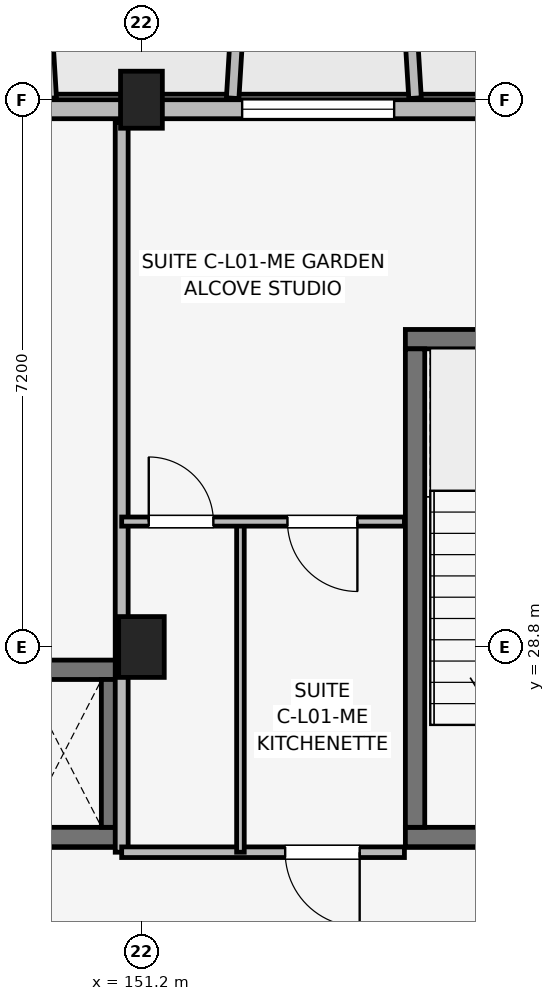
"""IFC4 building model, lengths in metres.
Left out: names, types, materials, properties, quantities, classifications, styles, units other than length and angle.
Written with IfcOpenShell. Run it as: python <this file> out.ifc"""

import sys

from ifc_helpers import new_model, si_unit, direction, frame, frame_2d, origin, origin_2d, place, context, subcontext, project, spatial, rectangle, extrude, element, fill, save


model = new_model("IFC4")
c1 = context("Model", 3, precision=1e-05, world=origin(), true_north=direction((0.0, 1.0)))
c2 = subcontext(c1, "Body", "Model", "MODEL_VIEW")
j1 = project(units=[si_unit("LENGTHUNIT", "METRE"), si_unit("PLANEANGLEUNIT", "RADIAN")], contexts=[c1])
p1 = place(None, origin())
s1 = spatial("IfcSite", under=j1, at=p1, CompositionType="ELEMENT")
p2 = place(p1, origin())
s2 = spatial("IfcBuilding", under=s1, at=p2, CompositionType="ELEMENT")
p3 = place(p2, frame((0.0, 0.0, 4.5)))
s3 = spatial("IfcBuildingStorey", under=s2, at=p3, CompositionType="ELEMENT", Elevation=4.5)
p4 = place(p3, frame((151.2, 28.8, 0.0), z_axis=(0.0, 0.0, 1.0), x_axis=(1.0, 0.0, 0.0)))
e1 = element("IfcColumn", 1, at=p4, inside=s3, PredefinedType="COLUMN", context=c2, shape_type="SweptSolid", body=[
    extrude(rectangle(XDim=0.6, YDim=0.8, at=origin_2d()), origin(), (0.0, 0.0, 1.0), 4.2),
])
p5 = place(p3, frame((151.2, 36.0, 0.0), z_axis=(0.0, 0.0, 1.0), x_axis=(1.0, 0.0, 0.0)))
e2 = element("IfcColumn", 2, at=p5, inside=s3, PredefinedType="COLUMN", context=c2, shape_type="SweptSolid", body=[
    extrude(rectangle(XDim=0.55, YDim=0.75, at=origin_2d()), origin(), (0.0, 0.0, 1.0), 4.2),
])
p6 = place(p3, frame((154.673, 26.3, 0.0), z_axis=(0.0, 0.0, 1.0), x_axis=(1.0, 0.0, 0.0)))
e3 = element("IfcWall", 3, at=p6, inside=s3, PredefinedType="SHEAR", context=c2, shape_type="SweptSolid", body=[
    extrude(rectangle(XDim=3.305, YDim=0.255, at=frame_2d((1.652, 0.0))), origin(), (0.0, 0.0, 1.0), 4.2),
])
p7 = place(p6, frame((1.127, 0.0, 0.0)))
e4 = element("IfcOpeningElement", 4, at=p7, cuts=e3, PredefinedType="OPENING", context=c2, shape_type="SweptSolid", body=[
    extrude(rectangle(XDim=1.05, YDim=2.12, at=frame_2d((0.525, 1.06))), frame((0.0, 0.137, 0.0), z_axis=(0.0, -1.0, 0.0), x_axis=(1.0, 0.0, 0.0)), (0.0, 0.0, 1.0), 0.275),
])
p8 = place(p3, frame((154.673, 32.85, 0.0), z_axis=(0.0, 0.0, 1.0), x_axis=(1.0, 0.0, 0.0)))
e5 = element("IfcWall", 5, at=p8, inside=s3, PredefinedType="SHEAR", context=c2, shape_type="SweptSolid", body=[
    extrude(rectangle(XDim=3.305, YDim=0.255, at=frame_2d((1.652, 0.0))), origin(), (0.0, 0.0, 1.0), 4.2),
])
p9 = place(p3, frame((154.8, 26.427, 0.0), z_axis=(0.0, 0.0, 1.0), x_axis=(0.0, 1.0, 0.0)))
e6 = element("IfcWall", 6, at=p9, inside=s3, PredefinedType="SHEAR", context=c2, shape_type="SweptSolid", body=[
    extrude(rectangle(XDim=6.295, YDim=0.255, at=frame_2d((3.147, 0.0))), origin(), (0.0, 0.0, 1.0), 4.2),
])
for number, where, z_axis, x_axis in (
    (7, (149.123, 26.3, 0.0), (0.0, 0.0, 1.0), (1.0, 0.0, 0.0)),
    (8, (149.123, 28.5, 0.0), (0.0, 0.0, 1.0), (1.0, 0.0, 0.0)),
):
    element("IfcWall", number, at=place(p3, frame(where, z_axis=z_axis, x_axis=x_axis)), inside=s3, PredefinedType="SHEAR", context=c2, shape_type="SweptSolid", body=[
        extrude(rectangle(XDim=1.805, YDim=0.255, at=frame_2d((0.902, 0.0))), origin(), (0.0, 0.0, 1.0), 4.2),
    ])
p10 = place(p3, frame((150.8, 26.427, 0.0), z_axis=(0.0, 0.0, 1.0), x_axis=(0.0, 1.0, 0.0)))
e9 = element("IfcWall", 9, at=p10, inside=s3, PredefinedType="SHEAR", context=c2, shape_type="SweptSolid", body=[
    extrude(rectangle(XDim=1.945, YDim=0.255, at=frame_2d((0.973, 0.0))), origin(), (0.0, 0.0, 1.0), 4.2),
])
p11 = place(p3, frame((162.6, 35.875, 0.0), z_axis=(0.0, 0.0, 1.0), x_axis=(-1.0, 0.0, 0.0)))
e10 = element("IfcWall", 10, at=p11, inside=s3, PredefinedType="SOLIDWALL", context=c2, shape_type="SweptSolid", body=[
    extrude(rectangle(XDim=30.0, YDim=0.25, at=frame_2d((15.0, 0.0))), origin(), (0.0, 0.0, 1.0), 3.48),
])
p12 = place(p11, frame((29.1, 0.0, 0.0), z_axis=(0.0, 0.0, 1.0), x_axis=(-1.0, 0.0, 0.0)))
e11 = element("IfcOpeningElement", 11, at=p12, cuts=e10, PredefinedType="OPENING", context=c2, shape_type="SweptSolid", body=[
    extrude(rectangle(XDim=1.8, YDim=2.15, at=frame_2d((0.9, 1.075))), frame((0.0, 0.135, 0.0), z_axis=(0.0, -1.0, 0.0), x_axis=(1.0, 0.0, 0.0)), (0.0, 0.0, 1.0), 0.27),
])
p13 = place(p11, frame((2.55, 0.0, 0.0), z_axis=(0.0, 0.0, 1.0), x_axis=(-1.0, 0.0, 0.0)))
e12 = element("IfcOpeningElement", 12, at=p13, cuts=e10, PredefinedType="OPENING", context=c2, shape_type="SweptSolid", body=[
    extrude(rectangle(XDim=1.5, YDim=2.15, at=frame_2d((0.75, 1.075))), frame((0.0, 0.135, 0.0), z_axis=(0.0, -1.0, 0.0), x_axis=(1.0, 0.0, 0.0)), (0.0, 0.0, 1.0), 0.27),
])
p14 = place(p11, frame((15.355, 0.0, 0.5)))
e13 = element("IfcOpeningElement", 13, at=p14, cuts=e10, PredefinedType="OPENING", context=c2, shape_type="SweptSolid", body=[
    extrude(rectangle(XDim=0.9, YDim=1.8, at=frame_2d((0.45, 0.9))), frame((0.0, 0.135, 0.0), z_axis=(0.0, -1.0, 0.0), x_axis=(1.0, 0.0, 0.0)), (0.0, 0.0, 1.0), 0.27),
])
p15 = place(p11, frame((8.075, 0.0, 0.7)))
e14 = element("IfcOpeningElement", 14, at=p15, cuts=e10, PredefinedType="OPENING", context=c2, shape_type="SweptSolid", body=[
    extrude(rectangle(XDim=2.0, YDim=1.65, at=frame_2d((1.0, 0.825))), frame((0.0, 0.135, 0.0), z_axis=(0.0, -1.0, 0.0), x_axis=(1.0, 0.0, 0.0)), (0.0, 0.0, 1.0), 0.27),
])
p16 = place(p11, frame((19.97, 0.0, 0.7)))
e15 = element("IfcOpeningElement", 15, at=p16, cuts=e10, PredefinedType="OPENING", context=c2, shape_type="SweptSolid", body=[
    extrude(rectangle(XDim=1.86, YDim=1.6, at=frame_2d((0.93, 0.8))), frame((0.0, 0.135, 0.0), z_axis=(0.0, -1.0, 0.0), x_axis=(1.0, 0.0, 0.0)), (0.0, 0.0, 1.0), 0.27),
])
p17 = place(p3, frame((150.0, 36.02, 0.0), z_axis=(0.0, 0.0, 1.0), x_axis=(-0.061170732449, 0.998127317276, 0.0)))
e16 = element("IfcWall", 16, at=p17, inside=s3, PredefinedType="ELEMENTEDWALL", context=c2, shape_type="SweptSolid", body=[
    extrude(rectangle(XDim=1.964, YDim=0.165, at=frame_2d((0.982, 0.0))), origin(), (0.0, 0.0, 1.0), 3.53),
])
for number, where, z_axis, x_axis in (
    (17, (152.4, 36.02, 0.0), (0.0, 0.0, 1.0), (0.061, 0.998, 0.0)),
    (18, (154.8, 36.02, 0.0), (0.0, 0.0, 1.0), (-0.061, 0.998, 0.0)),
):
    element("IfcWall", number, at=place(p3, frame(where, z_axis=z_axis, x_axis=x_axis)), inside=s3, PredefinedType="ELEMENTEDWALL", context=c2, shape_type="SweptSolid", body=[
        extrude(rectangle(XDim=1.964, YDim=0.165, at=frame_2d((0.982, 0.0))), origin(), (0.0, 0.0, 1.0), 3.58),
    ])
p18 = place(p3, frame((150.94, 26.1, 0.0), z_axis=(0.0, 0.0, 1.0), x_axis=(0.0, 1.0, 0.0)))
e19 = element("IfcWall", 19, at=p18, inside=s3, PredefinedType="PARTITIONING", context=c2, shape_type="SweptSolid", body=[
    extrude(rectangle(XDim=9.6, YDim=0.17, at=frame_2d((4.8, 0.0))), origin(), (0.0, 0.0, 1.0), 3.25),
])
p19 = place(p3, frame((150.94, 26.1, 0.0), z_axis=(0.0, 0.0, 1.0), x_axis=(1.0, 0.0, 0.0)))
e20 = element("IfcWall", 20, at=p19, inside=s3, PredefinedType="PARTITIONING", context=c2, shape_type="SweptSolid", body=[
    extrude(rectangle(XDim=3.72, YDim=0.14, at=frame_2d((1.86, 0.0))), origin(), (0.0, 0.0, 1.0), 3.25),
])
p20 = place(p19, frame((3.131, 0.0, 0.0), z_axis=(0.0, 0.0, 1.0), x_axis=(-1.0, 0.0, 0.0)))
e21 = element("IfcOpeningElement", 21, at=p20, cuts=e20, PredefinedType="OPENING", context=c2, shape_type="SweptSolid", body=[
    extrude(rectangle(XDim=0.98, YDim=2.1, at=frame_2d((0.49, 1.05))), frame((0.0, 0.08, 0.0), z_axis=(0.0, -1.0, 0.0), x_axis=(1.0, 0.0, 0.0)), (0.0, 0.0, 1.0), 0.16),
])
p21 = place(p3, frame((152.502, 26.1, 0.0), z_axis=(0.0, 0.0, 1.0), x_axis=(0.0, 1.0, 0.0)))
e22 = element("IfcWall", 22, at=p21, inside=s3, PredefinedType="PARTITIONING", context=c2, shape_type="SweptSolid", body=[
    extrude(rectangle(XDim=4.35, YDim=0.1, at=frame_2d((2.175, 0.0))), origin(), (0.0, 0.0, 1.0), 3.25),
])
p22 = place(p3, frame((150.94, 30.45, 0.0), z_axis=(0.0, 0.0, 1.0), x_axis=(1.0, 0.0, 0.0)))
e23 = element("IfcWall", 23, at=p22, inside=s3, PredefinedType="PARTITIONING", context=c2, shape_type="SweptSolid", body=[
    extrude(rectangle(XDim=3.72, YDim=0.12, at=frame_2d((1.86, 0.0))), origin(), (0.0, 0.0, 1.0), 3.25),
])
p23 = place(p22, frame((0.356, 0.0, 0.0)))
e24 = element("IfcOpeningElement", 24, at=p23, cuts=e23, PredefinedType="OPENING", context=c2, shape_type="SweptSolid", body=[
    extrude(rectangle(XDim=0.85, YDim=2.08, at=frame_2d((0.425, 1.04))), frame((0.0, 0.07, 0.0), z_axis=(0.0, -1.0, 0.0), x_axis=(1.0, 0.0, 0.0)), (0.0, 0.0, 1.0), 0.14),
])
p24 = place(p22, frame((3.101, 0.0, 0.0), z_axis=(0.0, 0.0, 1.0), x_axis=(-1.0, 0.0, 0.0)))
e25 = element("IfcOpeningElement", 25, at=p24, cuts=e23, PredefinedType="OPENING", context=c2, shape_type="SweptSolid", body=[
    extrude(rectangle(XDim=0.92, YDim=2.08, at=frame_2d((0.46, 1.04))), frame((0.0, 0.07, 0.0), z_axis=(0.0, -1.0, 0.0), x_axis=(1.0, 0.0, 0.0)), (0.0, 0.0, 1.0), 0.14),
])
p25 = place(p15, origin())
e26 = element("IfcWindow", 26, at=p25, inside=s3, PartitioningType="SINGLE_PANEL", PredefinedType="WINDOW", context=c2, shape_type="SweptSolid", body=[
    extrude(rectangle(XDim=2.0, YDim=1.65, at=frame_2d((1.0, 0.825))), frame((0.0, 0.03, 0.0), z_axis=(0.0, -1.0, 0.0), x_axis=(1.0, 0.0, 0.0)), (0.0, 0.0, 1.0), 0.06),
])
fill(e14, e26)
p26 = place(p20, origin())
e27 = element("IfcDoor", 27, at=p26, inside=s3, OperationType="SINGLE_SWING_RIGHT", PredefinedType="DOOR", context=c2, shape_type="SweptSolid", body=[
    extrude(rectangle(XDim=0.98, YDim=2.1, at=frame_2d((0.49, 1.05))), frame((0.0, 0.025, 0.0), z_axis=(0.0, -1.0, 0.0), x_axis=(1.0, 0.0, 0.0)), (0.0, 0.0, 1.0), 0.05),
])
fill(e21, e27)
p27 = place(p23, origin())
e28 = element("IfcDoor", 28, at=p27, inside=s3, OperationType="SINGLE_SWING_LEFT", PredefinedType="DOOR", context=c2, shape_type="SweptSolid", body=[
    extrude(rectangle(XDim=0.85, YDim=2.08, at=frame_2d((0.425, 1.04))), frame((0.0, 0.025, 0.0), z_axis=(0.0, -1.0, 0.0), x_axis=(1.0, 0.0, 0.0)), (0.0, 0.0, 1.0), 0.05),
])
fill(e24, e28)
p28 = place(p24, origin())
e29 = element("IfcDoor", 29, at=p28, inside=s3, OperationType="SINGLE_SWING_RIGHT", PredefinedType="DOOR", context=c2, shape_type="SweptSolid", body=[
    extrude(rectangle(XDim=0.92, YDim=2.08, at=frame_2d((0.46, 1.04))), frame((0.0, 0.025, 0.0), z_axis=(0.0, -1.0, 0.0), x_axis=(1.0, 0.0, 0.0)), (0.0, 0.0, 1.0), 0.05),
])
fill(e25, e29)
save(model, sys.argv[1])
